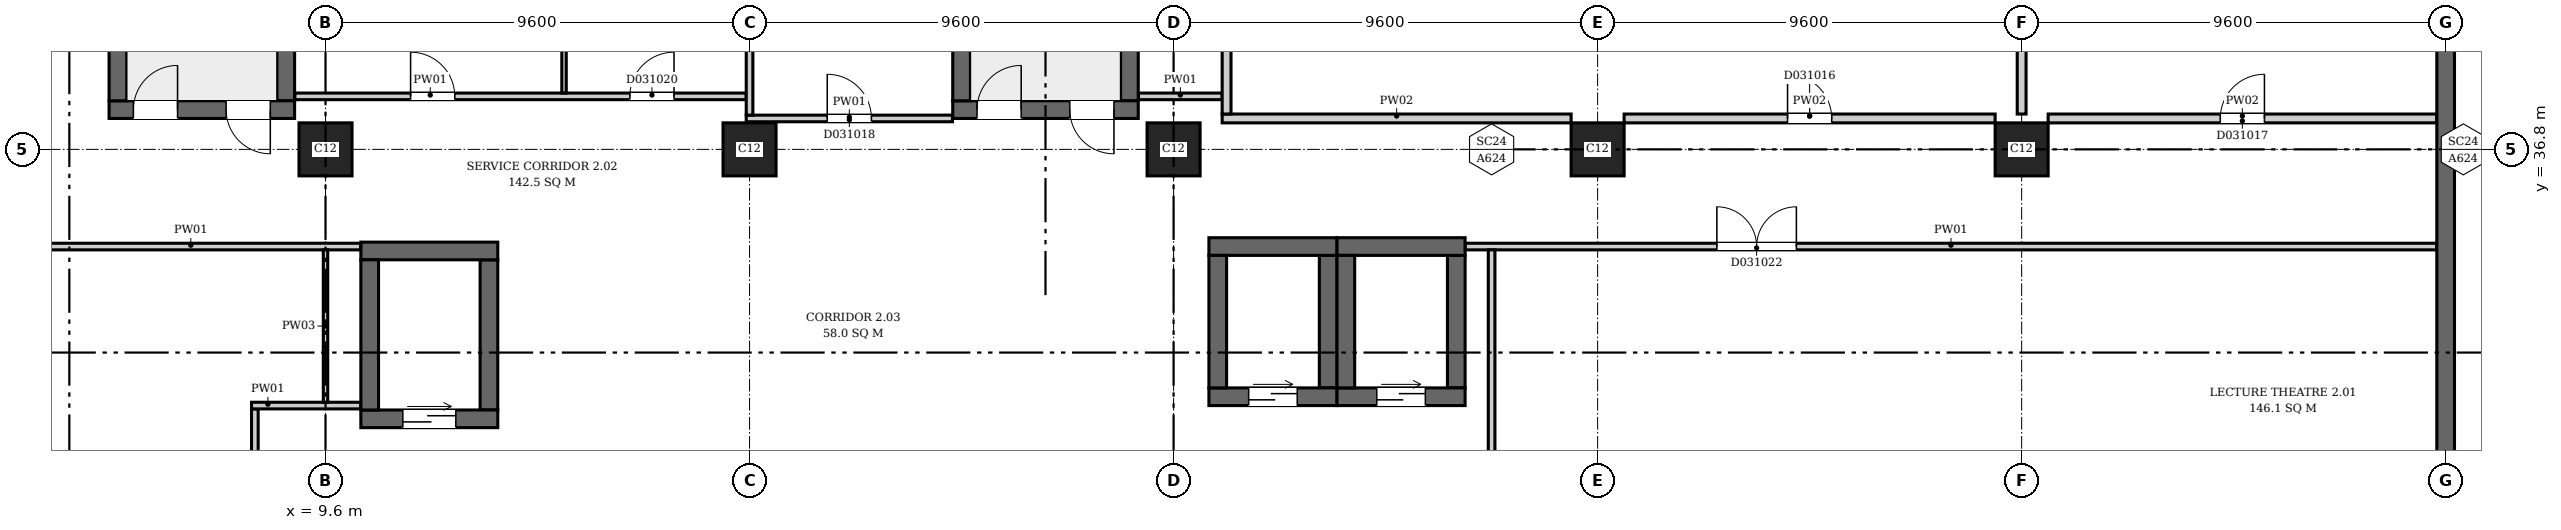
"""IFC4 building model, lengths in metres.
Left out: names, types, materials, properties, quantities, classifications, styles, units other than length and angle.
Written with IfcOpenShell. Run it as: python <this file> out.ifc"""

import sys

from ifc_helpers import new_model, si_unit, direction, frame, frame_2d, origin, origin_2d, place, context, subcontext, project, spatial, rectangle, extrude, element, fill, save


model = new_model("IFC4")
c1 = context("Model", 3, precision=1e-05, world=origin(), true_north=direction((0.0, 1.0)))
c2 = subcontext(c1, "Body", "Model", "MODEL_VIEW")
j1 = project(units=[si_unit("LENGTHUNIT", "METRE"), si_unit("PLANEANGLEUNIT", "RADIAN")], contexts=[c1])
p1 = place(None, origin())
s1 = spatial("IfcSite", under=j1, at=p1, CompositionType="ELEMENT")
p2 = place(p1, origin())
s2 = spatial("IfcBuilding", under=s1, at=p2, CompositionType="ELEMENT")
p3 = place(p2, frame((0.0, 0.0, 14.2)))
s3 = spatial("IfcBuildingStorey", under=s2, at=p3, CompositionType="ELEMENT", Elevation=14.2)
p4 = place(p3, frame((57.6, -0.2, 0.0), z_axis=(0.0, 0.0, 1.0), x_axis=(0.0, 1.0, 0.0)))
e1 = element("IfcWall", 1, at=p4, inside=s3, PredefinedType="SHEAR", context=c2, shape_type="SweptSolid", body=[
    extrude(rectangle(XDim=46.88, YDim=0.4, at=frame_2d((23.44, 0.0))), origin(), (0.0, 0.0, 1.0), 7.5),
])
p5 = place(p3, frame((4.7, 37.7, 0.0), z_axis=(0.0, 0.0, 1.0), x_axis=(1.0, 0.0, 0.0)))
e2 = element("IfcWall", 2, at=p5, inside=s3, PredefinedType="SHEAR", context=c2, shape_type="SweptSolid", body=[
    extrude(rectangle(XDim=4.2, YDim=0.4, at=frame_2d((2.1, 0.0))), origin(), (0.0, 0.0, 1.0), 7.5),
])
p6 = place(p5, frame((0.55, 0.0, 0.0)))
e3 = element("IfcOpeningElement", 3, at=p6, cuts=e2, PredefinedType="OPENING", context=c2, shape_type="SweptSolid", body=[
    extrude(rectangle(XDim=1.0, YDim=2.1, at=frame_2d((0.5, 1.05))), frame((0.0, 0.21, 0.0), z_axis=(0.0, -1.0, 0.0), x_axis=(1.0, 0.0, 0.0)), (0.0, 0.0, 1.0), 0.42),
])
p7 = place(p5, frame((2.65, 0.0, 0.0)))
e4 = element("IfcOpeningElement", 4, at=p7, cuts=e2, PredefinedType="OPENING", context=c2, shape_type="SweptSolid", body=[
    extrude(rectangle(XDim=1.0, YDim=2.1, at=frame_2d((0.5, 1.05))), frame((0.0, 0.21, 0.0), z_axis=(0.0, -1.0, 0.0), x_axis=(1.0, 0.0, 0.0)), (0.0, 0.0, 1.0), 0.42),
])
for number, where, z_axis, x_axis in (
    (5, (4.9, 37.9, 0.0), (0.0, 0.0, 1.0), (0.0, 1.0, 0.0)),
    (6, (8.7, 37.9, 0.0), (0.0, 0.0, 1.0), (0.0, 1.0, 0.0)),
):
    element("IfcWall", number, at=place(p3, frame(where, z_axis=z_axis, x_axis=x_axis)), inside=s3, PredefinedType="SHEAR", context=c2, shape_type="SweptSolid", body=[
        extrude(rectangle(XDim=6.6, YDim=0.4, at=frame_2d((3.3, 0.0))), origin(), (0.0, 0.0, 1.0), 7.5),
    ])
p8 = place(p3, frame((23.8, 37.7, 0.0), z_axis=(0.0, 0.0, 1.0), x_axis=(1.0, 0.0, 0.0)))
e7 = element("IfcWall", 7, at=p8, inside=s3, PredefinedType="SHEAR", context=c2, shape_type="SweptSolid", body=[
    extrude(rectangle(XDim=4.2, YDim=0.4, at=frame_2d((2.1, 0.0))), origin(), (0.0, 0.0, 1.0), 7.5),
])
p9 = place(p8, frame((0.55, 0.0, 0.0)))
e8 = element("IfcOpeningElement", 8, at=p9, cuts=e7, PredefinedType="OPENING", context=c2, shape_type="SweptSolid", body=[
    extrude(rectangle(XDim=1.0, YDim=2.1, at=frame_2d((0.5, 1.05))), frame((0.0, 0.21, 0.0), z_axis=(0.0, -1.0, 0.0), x_axis=(1.0, 0.0, 0.0)), (0.0, 0.0, 1.0), 0.42),
])
p10 = place(p8, frame((2.65, 0.0, 0.0)))
e9 = element("IfcOpeningElement", 9, at=p10, cuts=e7, PredefinedType="OPENING", context=c2, shape_type="SweptSolid", body=[
    extrude(rectangle(XDim=1.0, YDim=2.1, at=frame_2d((0.5, 1.05))), frame((0.0, 0.21, 0.0), z_axis=(0.0, -1.0, 0.0), x_axis=(1.0, 0.0, 0.0)), (0.0, 0.0, 1.0), 0.42),
])
for number, where, z_axis, x_axis in (
    (10, (24.0, 37.9, 0.0), (0.0, 0.0, 1.0), (0.0, 1.0, 0.0)),
    (11, (27.8, 37.9, 0.0), (0.0, 0.0, 1.0), (0.0, 1.0, 0.0)),
):
    element("IfcWall", number, at=place(p3, frame(where, z_axis=z_axis, x_axis=x_axis)), inside=s3, PredefinedType="SHEAR", context=c2, shape_type="SweptSolid", body=[
        extrude(rectangle(XDim=6.6, YDim=0.4, at=frame_2d((3.3, 0.0))), origin(), (0.0, 0.0, 1.0), 7.5),
    ])
p11 = place(p3, frame((10.4, 30.7, 0.0), z_axis=(0.0, 0.0, 1.0), x_axis=(1.0, 0.0, 0.0)))
e12 = element("IfcWall", 12, at=p11, inside=s3, PredefinedType="SHEAR", context=c2, shape_type="SweptSolid", body=[
    extrude(rectangle(XDim=3.1, YDim=0.4, at=frame_2d((1.55, 0.0))), origin(), (0.0, 0.0, 1.0), 7.5),
])
p12 = place(p11, frame((0.95, 0.0, 0.0)))
e13 = element("IfcOpeningElement", 13, at=p12, cuts=e12, PredefinedType="OPENING", context=c2, shape_type="SweptSolid", body=[
    extrude(rectangle(XDim=1.2, YDim=2.1, at=frame_2d((0.6, 1.05))), frame((0.0, 0.21, 0.0), z_axis=(0.0, -1.0, 0.0), x_axis=(1.0, 0.0, 0.0)), (0.0, 0.0, 1.0), 0.42),
])
p13 = place(p3, frame((10.4, 34.5, 0.0), z_axis=(0.0, 0.0, 1.0), x_axis=(1.0, 0.0, 0.0)))
e14 = element("IfcWall", 14, at=p13, inside=s3, PredefinedType="SHEAR", context=c2, shape_type="SweptSolid", body=[
    extrude(rectangle(XDim=3.1, YDim=0.4, at=frame_2d((1.55, 0.0))), origin(), (0.0, 0.0, 1.0), 7.5),
])
for number, where, z_axis, x_axis in (
    (15, (10.6, 30.9, 0.0), (0.0, 0.0, 1.0), (0.0, 1.0, 0.0)),
    (16, (13.3, 30.9, 0.0), (0.0, 0.0, 1.0), (0.0, 1.0, 0.0)),
):
    element("IfcWall", number, at=place(p3, frame(where, z_axis=z_axis, x_axis=x_axis)), inside=s3, PredefinedType="SHEAR", context=c2, shape_type="SweptSolid", body=[
        extrude(rectangle(XDim=3.4, YDim=0.4, at=frame_2d((1.7, 0.0))), origin(), (0.0, 0.0, 1.0), 7.5),
    ])
p14 = place(p3, frame((29.6, 31.2, 0.0), z_axis=(0.0, 0.0, 1.0), x_axis=(1.0, 0.0, 0.0)))
e17 = element("IfcWall", 17, at=p14, inside=s3, PredefinedType="SHEAR", context=c2, shape_type="SweptSolid", body=[
    extrude(rectangle(XDim=2.9, YDim=0.4, at=frame_2d((1.45, 0.0))), origin(), (0.0, 0.0, 1.0), 7.5),
])
p15 = place(p14, frame((0.9, 0.0, 0.0)))
e18 = element("IfcOpeningElement", 18, at=p15, cuts=e17, PredefinedType="OPENING", context=c2, shape_type="SweptSolid", body=[
    extrude(rectangle(XDim=1.1, YDim=2.1, at=frame_2d((0.55, 1.05))), frame((0.0, 0.21, 0.0), z_axis=(0.0, -1.0, 0.0), x_axis=(1.0, 0.0, 0.0)), (0.0, 0.0, 1.0), 0.42),
])
p16 = place(p3, frame((29.6, 34.6, 0.0), z_axis=(0.0, 0.0, 1.0), x_axis=(1.0, 0.0, 0.0)))
e19 = element("IfcWall", 19, at=p16, inside=s3, PredefinedType="SHEAR", context=c2, shape_type="SweptSolid", body=[
    extrude(rectangle(XDim=2.9, YDim=0.4, at=frame_2d((1.45, 0.0))), origin(), (0.0, 0.0, 1.0), 7.5),
])
for number, where, z_axis, x_axis in (
    (20, (29.8, 31.4, 0.0), (0.0, 0.0, 1.0), (0.0, 1.0, 0.0)),
    (21, (32.3, 31.4, 0.0), (0.0, 0.0, 1.0), (0.0, 1.0, 0.0)),
):
    element("IfcWall", number, at=place(p3, frame(where, z_axis=z_axis, x_axis=x_axis)), inside=s3, PredefinedType="SHEAR", context=c2, shape_type="SweptSolid", body=[
        extrude(rectangle(XDim=3.0, YDim=0.4, at=frame_2d((1.5, 0.0))), origin(), (0.0, 0.0, 1.0), 7.5),
    ])
p17 = place(p3, frame((32.5, 31.2, 0.0), z_axis=(0.0, 0.0, 1.0), x_axis=(1.0, 0.0, 0.0)))
e22 = element("IfcWall", 22, at=p17, inside=s3, PredefinedType="SHEAR", context=c2, shape_type="SweptSolid", body=[
    extrude(rectangle(XDim=2.9, YDim=0.4, at=frame_2d((1.45, 0.0))), origin(), (0.0, 0.0, 1.0), 7.5),
])
p18 = place(p17, frame((0.9, 0.0, 0.0)))
e23 = element("IfcOpeningElement", 23, at=p18, cuts=e22, PredefinedType="OPENING", context=c2, shape_type="SweptSolid", body=[
    extrude(rectangle(XDim=1.1, YDim=2.1, at=frame_2d((0.55, 1.05))), frame((0.0, 0.21, 0.0), z_axis=(0.0, -1.0, 0.0), x_axis=(1.0, 0.0, 0.0)), (0.0, 0.0, 1.0), 0.42),
])
p19 = place(p3, frame((32.5, 34.6, 0.0), z_axis=(0.0, 0.0, 1.0), x_axis=(1.0, 0.0, 0.0)))
e24 = element("IfcWall", 24, at=p19, inside=s3, PredefinedType="SHEAR", context=c2, shape_type="SweptSolid", body=[
    extrude(rectangle(XDim=2.9, YDim=0.4, at=frame_2d((1.45, 0.0))), origin(), (0.0, 0.0, 1.0), 7.5),
])
for number, where, z_axis, x_axis in (
    (25, (32.7, 31.4, 0.0), (0.0, 0.0, 1.0), (0.0, 1.0, 0.0)),
    (26, (35.2, 31.4, 0.0), (0.0, 0.0, 1.0), (0.0, 1.0, 0.0)),
):
    element("IfcWall", number, at=place(p3, frame(where, z_axis=z_axis, x_axis=x_axis)), inside=s3, PredefinedType="SHEAR", context=c2, shape_type="SweptSolid", body=[
        extrude(rectangle(XDim=3.0, YDim=0.4, at=frame_2d((1.5, 0.0))), origin(), (0.0, 0.0, 1.0), 7.5),
    ])
for number, where, z_axis, x_axis in (
    (27, (9.6, 36.8, 0.0), (0.0, 0.0, 1.0), (1.0, 0.0, 0.0)),
    (28, (19.2, 36.8, 0.0), (0.0, 0.0, 1.0), (1.0, 0.0, 0.0)),
    (29, (28.8, 36.8, 0.0), (0.0, 0.0, 1.0), (1.0, 0.0, 0.0)),
    (30, (38.4, 36.8, 0.0), (0.0, 0.0, 1.0), (1.0, 0.0, 0.0)),
    (31, (48.0, 36.8, 0.0), (0.0, 0.0, 1.0), (1.0, 0.0, 0.0)),
):
    element("IfcColumn", number, at=place(p3, frame(where, z_axis=z_axis, x_axis=x_axis)), inside=s3, PredefinedType="COLUMN", context=c2, shape_type="SweptSolid", body=[
        extrude(rectangle(XDim=1.2, YDim=1.2, at=origin_2d()), origin(), (0.0, 0.0, 1.0), 7.5),
    ])
p20 = place(p3, frame((2.706, 34.6, 0.0), z_axis=(0.0, 0.0, 1.0), x_axis=(1.0, 0.0, 0.0)))
e32 = element("IfcWall", 32, at=p20, inside=s3, PredefinedType="PARTITIONING", context=c2, shape_type="SweptSolid", body=[
    extrude(rectangle(XDim=7.688, YDim=0.15, at=frame_2d((3.844, 0.0))), origin(), (0.0, 0.0, 1.0), 7.15),
])
p21 = place(p3, frame((8.0, 27.3, 0.0), z_axis=(0.0, 0.0, 1.0), x_axis=(0.0, 1.0, 0.0)))
e33 = element("IfcWall", 33, at=p21, inside=s3, PredefinedType="PARTITIONING", context=c2, shape_type="SweptSolid", body=[
    extrude(rectangle(XDim=3.625, YDim=0.15, at=frame_2d((1.812, 0.0))), origin(), (0.0, 0.0, 1.0), 7.15),
])
p22 = place(p3, frame((7.925, 31.0, 0.0), z_axis=(0.0, 0.0, 1.0), x_axis=(1.0, 0.0, 0.0)))
e34 = element("IfcWall", 34, at=p22, inside=s3, PredefinedType="PARTITIONING", context=c2, shape_type="SweptSolid", body=[
    extrude(rectangle(XDim=2.469, YDim=0.15, at=frame_2d((1.234, 0.0))), origin(), (0.0, 0.0, 1.0), 7.15),
])
p23 = place(p3, frame((8.906, 38.0, 0.0), z_axis=(0.0, 0.0, 1.0), x_axis=(1.0, 0.0, 0.0)))
e35 = element("IfcWall", 35, at=p23, inside=s3, PredefinedType="PARTITIONING", context=c2, shape_type="SweptSolid", body=[
    extrude(rectangle(XDim=10.219, YDim=0.15, at=frame_2d((5.109, 0.0))), origin(), (0.0, 0.0, 1.0), 7.15),
])
p24 = place(p23, frame((2.62, 0.0, 0.0)))
e36 = element("IfcOpeningElement", 36, at=p24, cuts=e35, PredefinedType="OPENING", context=c2, shape_type="SweptSolid", body=[
    extrude(rectangle(XDim=1.0, YDim=2.1, at=frame_2d((0.5, 1.05))), frame((0.0, 0.085, 0.0), z_axis=(0.0, -1.0, 0.0), x_axis=(1.0, 0.0, 0.0)), (0.0, 0.0, 1.0), 0.17),
])
p25 = place(p23, frame((7.584, 0.0, 0.0)))
e37 = element("IfcOpeningElement", 37, at=p25, cuts=e35, PredefinedType="OPENING", context=c2, shape_type="SweptSolid", body=[
    extrude(rectangle(XDim=1.0, YDim=2.1, at=frame_2d((0.5, 1.05))), frame((0.0, 0.085, 0.0), z_axis=(0.0, -1.0, 0.0), x_axis=(1.0, 0.0, 0.0)), (0.0, 0.0, 1.0), 0.17),
])
p26 = place(p3, frame((9.6, 31.075, 0.0), z_axis=(0.0, 0.0, 1.0), x_axis=(0.0, 1.0, 0.0)))
e38 = element("IfcWall", 38, at=p26, inside=s3, PredefinedType="PARTITIONING", context=c2, shape_type="SweptSolid", body=[
    extrude(rectangle(XDim=3.45, YDim=0.1, at=frame_2d((1.725, 0.0))), origin(), (0.0, 0.0, 1.0), 6.75),
])
p27 = place(p3, frame((15.0, 38.075, 0.0), z_axis=(0.0, 0.0, 1.0), x_axis=(0.0, 1.0, 0.0)))
e39 = element("IfcWall", 39, at=p27, inside=s3, PredefinedType="PARTITIONING", context=c2, shape_type="SweptSolid", body=[
    extrude(rectangle(XDim=5.65, YDim=0.1, at=frame_2d((2.825, 0.0))), origin(), (0.0, 0.0, 1.0), 7.15),
])
p28 = place(p3, frame((19.125, 37.5, 0.0), z_axis=(0.0, 0.0, 1.0), x_axis=(1.0, 0.0, 0.0)))
e40 = element("IfcWall", 40, at=p28, inside=s3, PredefinedType="PARTITIONING", context=c2, shape_type="SweptSolid", body=[
    extrude(rectangle(XDim=4.669, YDim=0.15, at=frame_2d((2.334, 0.0))), origin(), (0.0, 0.0, 1.0), 7.15),
])
p29 = place(p28, frame((1.834, 0.0, 0.0)))
e41 = element("IfcOpeningElement", 41, at=p29, cuts=e40, PredefinedType="OPENING", context=c2, shape_type="SweptSolid", body=[
    extrude(rectangle(XDim=1.0, YDim=2.1, at=frame_2d((0.5, 1.05))), frame((0.0, 0.085, 0.0), z_axis=(0.0, -1.0, 0.0), x_axis=(1.0, 0.0, 0.0)), (0.0, 0.0, 1.0), 0.17),
])
p30 = place(p3, frame((19.2, 37.575, 0.0), z_axis=(0.0, 0.0, 1.0), x_axis=(0.0, 1.0, 0.0)))
e42 = element("IfcWall", 42, at=p30, inside=s3, PredefinedType="PARTITIONING", context=c2, shape_type="SweptSolid", body=[
    extrude(rectangle(XDim=6.15, YDim=0.15, at=frame_2d((3.075, 0.0))), origin(), (0.0, 0.0, 1.0), 6.75),
])
p31 = place(p3, frame((28.006, 38.0, 0.0), z_axis=(0.0, 0.0, 1.0), x_axis=(1.0, 0.0, 0.0)))
e43 = element("IfcWall", 43, at=p31, inside=s3, PredefinedType="PARTITIONING", context=c2, shape_type="SweptSolid", body=[
    extrude(rectangle(XDim=1.894, YDim=0.15, at=frame_2d((0.947, 0.0))), origin(), (0.0, 0.0, 1.0), 7.15),
])
p32 = place(p3, frame((29.9, 37.5, 0.0), z_axis=(0.0, 0.0, 1.0), x_axis=(1.0, 0.0, 0.0)))
e44 = element("IfcWall", 44, at=p32, inside=s3, PredefinedType="PARTITIONING", context=c2, shape_type="SweptSolid", body=[
    extrude(rectangle(XDim=7.9, YDim=0.2, at=frame_2d((3.95, 0.0))), origin(), (0.0, 0.0, 1.0), 7.15),
])
p33 = place(p3, frame((30.0, 37.6, 0.0), z_axis=(0.0, 0.0, 1.0), x_axis=(0.0, 1.0, 0.0)))
e45 = element("IfcWall", 45, at=p33, inside=s3, PredefinedType="PARTITIONING", context=c2, shape_type="SweptSolid", body=[
    extrude(rectangle(XDim=6.1, YDim=0.2, at=frame_2d((3.05, 0.0))), origin(), (0.0, 0.0, 1.0), 7.15),
])
p34 = place(p3, frame((35.406, 34.6, 0.0), z_axis=(0.0, 0.0, 1.0), x_axis=(1.0, 0.0, 0.0)))
e46 = element("IfcWall", 46, at=p34, inside=s3, PredefinedType="PARTITIONING", context=c2, shape_type="SweptSolid", body=[
    extrude(rectangle(XDim=21.988, YDim=0.15, at=frame_2d((10.994, 0.0))), origin(), (0.0, 0.0, 1.0), 7.15),
])
p35 = place(p34, frame((5.694, 0.0, 0.0)))
e47 = element("IfcOpeningElement", 47, at=p35, cuts=e46, PredefinedType="OPENING", context=c2, shape_type="SweptSolid", body=[
    extrude(rectangle(XDim=1.8, YDim=2.1, at=frame_2d((0.9, 1.05))), frame((0.0, 0.085, 0.0), z_axis=(0.0, -1.0, 0.0), x_axis=(1.0, 0.0, 0.0)), (0.0, 0.0, 1.0), 0.17),
])
p36 = place(p3, frame((36.0, 27.675, 0.0), z_axis=(0.0, 0.0, 1.0), x_axis=(0.0, 1.0, 0.0)))
e48 = element("IfcWall", 48, at=p36, inside=s3, PredefinedType="PARTITIONING", context=c2, shape_type="SweptSolid", body=[
    extrude(rectangle(XDim=6.85, YDim=0.15, at=frame_2d((3.425, 0.0))), origin(), (0.0, 0.0, 1.0), 7.15),
])
p37 = place(p3, frame((39.0, 37.5, 0.0), z_axis=(0.0, 0.0, 1.0), x_axis=(1.0, 0.0, 0.0)))
e49 = element("IfcWall", 49, at=p37, inside=s3, PredefinedType="PARTITIONING", context=c2, shape_type="SweptSolid", body=[
    extrude(rectangle(XDim=8.4, YDim=0.2, at=frame_2d((4.2, 0.0))), origin(), (0.0, 0.0, 1.0), 7.15),
])
p38 = place(p37, frame((3.7, 0.0, 0.0)))
e50 = element("IfcOpeningElement", 50, at=p38, cuts=e49, PredefinedType="OPENING", context=c2, shape_type="SweptSolid", body=[
    extrude(rectangle(XDim=1.0, YDim=2.1, at=frame_2d((0.5, 1.05))), frame((0.0, 0.11, 0.0), z_axis=(0.0, -1.0, 0.0), x_axis=(1.0, 0.0, 0.0)), (0.0, 0.0, 1.0), 0.22),
])
p39 = place(p3, frame((48.0, 37.6, 0.0), z_axis=(0.0, 0.0, 1.0), x_axis=(0.0, 1.0, 0.0)))
e51 = element("IfcWall", 51, at=p39, inside=s3, PredefinedType="PARTITIONING", context=c2, shape_type="SweptSolid", body=[
    extrude(rectangle(XDim=6.1, YDim=0.2, at=frame_2d((3.05, 0.0))), origin(), (0.0, 0.0, 1.0), 6.75),
])
p40 = place(p3, frame((48.6, 37.5, 0.0), z_axis=(0.0, 0.0, 1.0), x_axis=(1.0, 0.0, 0.0)))
e52 = element("IfcWall", 52, at=p40, inside=s3, PredefinedType="PARTITIONING", context=c2, shape_type="SweptSolid", body=[
    extrude(rectangle(XDim=8.794, YDim=0.2, at=frame_2d((4.397, 0.0))), origin(), (0.0, 0.0, 1.0), 7.15),
])
p41 = place(p40, frame((3.897, 0.0, 0.0)))
e53 = element("IfcOpeningElement", 53, at=p41, cuts=e52, PredefinedType="OPENING", context=c2, shape_type="SweptSolid", body=[
    extrude(rectangle(XDim=1.0, YDim=2.1, at=frame_2d((0.5, 1.05))), frame((0.0, 0.11, 0.0), z_axis=(0.0, -1.0, 0.0), x_axis=(1.0, 0.0, 0.0)), (0.0, 0.0, 1.0), 0.22),
])
p42 = place(p6, origin())
e54 = element("IfcDoor", 54, at=p42, inside=s3, OperationType="SINGLE_SWING_RIGHT", PredefinedType="DOOR", context=c2, shape_type="SweptSolid", body=[
    extrude(rectangle(XDim=1.0, YDim=2.1, at=frame_2d((0.5, 1.05))), frame((0.0, 0.025, 0.0), z_axis=(0.0, -1.0, 0.0), x_axis=(1.0, 0.0, 0.0)), (0.0, 0.0, 1.0), 0.05),
])
fill(e3, e54)
p43 = place(p7, origin())
e55 = element("IfcDoor", 55, at=p43, inside=s3, OperationType="SINGLE_SWING_LEFT", PredefinedType="DOOR", context=c2, shape_type="SweptSolid", body=[
    extrude(rectangle(XDim=1.0, YDim=2.1, at=frame_2d((0.5, 1.05))), frame((0.0, 0.025, 0.0), z_axis=(0.0, -1.0, 0.0), x_axis=(1.0, 0.0, 0.0)), (0.0, 0.0, 1.0), 0.05),
])
fill(e4, e55)
p44 = place(p9, origin())
e56 = element("IfcDoor", 56, at=p44, inside=s3, OperationType="SINGLE_SWING_RIGHT", PredefinedType="DOOR", context=c2, shape_type="SweptSolid", body=[
    extrude(rectangle(XDim=1.0, YDim=2.1, at=frame_2d((0.5, 1.05))), frame((0.0, 0.025, 0.0), z_axis=(0.0, -1.0, 0.0), x_axis=(1.0, 0.0, 0.0)), (0.0, 0.0, 1.0), 0.05),
])
fill(e8, e56)
p45 = place(p10, origin())
e57 = element("IfcDoor", 57, at=p45, inside=s3, OperationType="SINGLE_SWING_LEFT", PredefinedType="DOOR", context=c2, shape_type="SweptSolid", body=[
    extrude(rectangle(XDim=1.0, YDim=2.1, at=frame_2d((0.5, 1.05))), frame((0.0, 0.025, 0.0), z_axis=(0.0, -1.0, 0.0), x_axis=(1.0, 0.0, 0.0)), (0.0, 0.0, 1.0), 0.05),
])
fill(e9, e57)
p46 = place(p12, origin())
e58 = element("IfcDoor", 58, at=p46, inside=s3, OperationType="DOUBLE_DOOR_SLIDING", PredefinedType="DOOR", context=c2, shape_type="SweptSolid", body=[
    extrude(rectangle(XDim=1.2, YDim=2.1, at=frame_2d((0.6, 1.05))), frame((0.0, 0.025, 0.0), z_axis=(0.0, -1.0, 0.0), x_axis=(1.0, 0.0, 0.0)), (0.0, 0.0, 1.0), 0.05),
])
fill(e13, e58)
p47 = place(p15, origin())
e59 = element("IfcDoor", 59, at=p47, inside=s3, OperationType="DOUBLE_DOOR_SLIDING", PredefinedType="DOOR", context=c2, shape_type="SweptSolid", body=[
    extrude(rectangle(XDim=1.1, YDim=2.1, at=frame_2d((0.55, 1.05))), frame((0.0, 0.025, 0.0), z_axis=(0.0, -1.0, 0.0), x_axis=(1.0, 0.0, 0.0)), (0.0, 0.0, 1.0), 0.05),
])
fill(e18, e59)
p48 = place(p18, origin())
e60 = element("IfcDoor", 60, at=p48, inside=s3, OperationType="DOUBLE_DOOR_SLIDING", PredefinedType="DOOR", context=c2, shape_type="SweptSolid", body=[
    extrude(rectangle(XDim=1.1, YDim=2.1, at=frame_2d((0.55, 1.05))), frame((0.0, 0.025, 0.0), z_axis=(0.0, -1.0, 0.0), x_axis=(1.0, 0.0, 0.0)), (0.0, 0.0, 1.0), 0.05),
])
fill(e23, e60)
p49 = place(p38, origin())
e61 = element("IfcDoor", 61, at=p49, inside=s3, OperationType="SINGLE_SWING_LEFT", PredefinedType="DOOR", context=c2, shape_type="SweptSolid", body=[
    extrude(rectangle(XDim=1.0, YDim=2.1, at=frame_2d((0.5, 1.05))), frame((0.0, 0.025, 0.0), z_axis=(0.0, -1.0, 0.0), x_axis=(1.0, 0.0, 0.0)), (0.0, 0.0, 1.0), 0.05),
])
fill(e50, e61)
p50 = place(p41, origin())
e62 = element("IfcDoor", 62, at=p50, inside=s3, OperationType="SINGLE_SWING_RIGHT", PredefinedType="DOOR", context=c2, shape_type="SweptSolid", body=[
    extrude(rectangle(XDim=1.0, YDim=2.1, at=frame_2d((0.5, 1.05))), frame((0.0, 0.025, 0.0), z_axis=(0.0, -1.0, 0.0), x_axis=(1.0, 0.0, 0.0)), (0.0, 0.0, 1.0), 0.05),
])
fill(e53, e62)
p51 = place(p29, origin())
e63 = element("IfcDoor", 63, at=p51, inside=s3, OperationType="SINGLE_SWING_LEFT", PredefinedType="DOOR", context=c2, shape_type="SweptSolid", body=[
    extrude(rectangle(XDim=1.0, YDim=2.1, at=frame_2d((0.5, 1.05))), frame((0.0, 0.025, 0.0), z_axis=(0.0, -1.0, 0.0), x_axis=(1.0, 0.0, 0.0)), (0.0, 0.0, 1.0), 0.05),
])
fill(e41, e63)
p52 = place(p24, origin())
e64 = element("IfcDoor", 64, at=p52, inside=s3, OperationType="SINGLE_SWING_LEFT", PredefinedType="DOOR", context=c2, shape_type="SweptSolid", body=[
    extrude(rectangle(XDim=1.0, YDim=2.1, at=frame_2d((0.5, 1.05))), frame((0.0, 0.025, 0.0), z_axis=(0.0, -1.0, 0.0), x_axis=(1.0, 0.0, 0.0)), (0.0, 0.0, 1.0), 0.05),
])
fill(e36, e64)
p53 = place(p25, origin())
e65 = element("IfcDoor", 65, at=p53, inside=s3, OperationType="SINGLE_SWING_RIGHT", PredefinedType="DOOR", context=c2, shape_type="SweptSolid", body=[
    extrude(rectangle(XDim=1.0, YDim=2.1, at=frame_2d((0.5, 1.05))), frame((0.0, 0.025, 0.0), z_axis=(0.0, -1.0, 0.0), x_axis=(1.0, 0.0, 0.0)), (0.0, 0.0, 1.0), 0.05),
])
fill(e37, e65)
p54 = place(p35, origin())
e66 = element("IfcDoor", 66, at=p54, inside=s3, OperationType="DOUBLE_DOOR_SINGLE_SWING", PredefinedType="DOOR", context=c2, shape_type="SweptSolid", body=[
    extrude(rectangle(XDim=1.8, YDim=2.1, at=frame_2d((0.9, 1.05))), frame((0.0, 0.025, 0.0), z_axis=(0.0, -1.0, 0.0), x_axis=(1.0, 0.0, 0.0)), (0.0, 0.0, 1.0), 0.05),
])
fill(e47, e66)
save(model, sys.argv[1])
